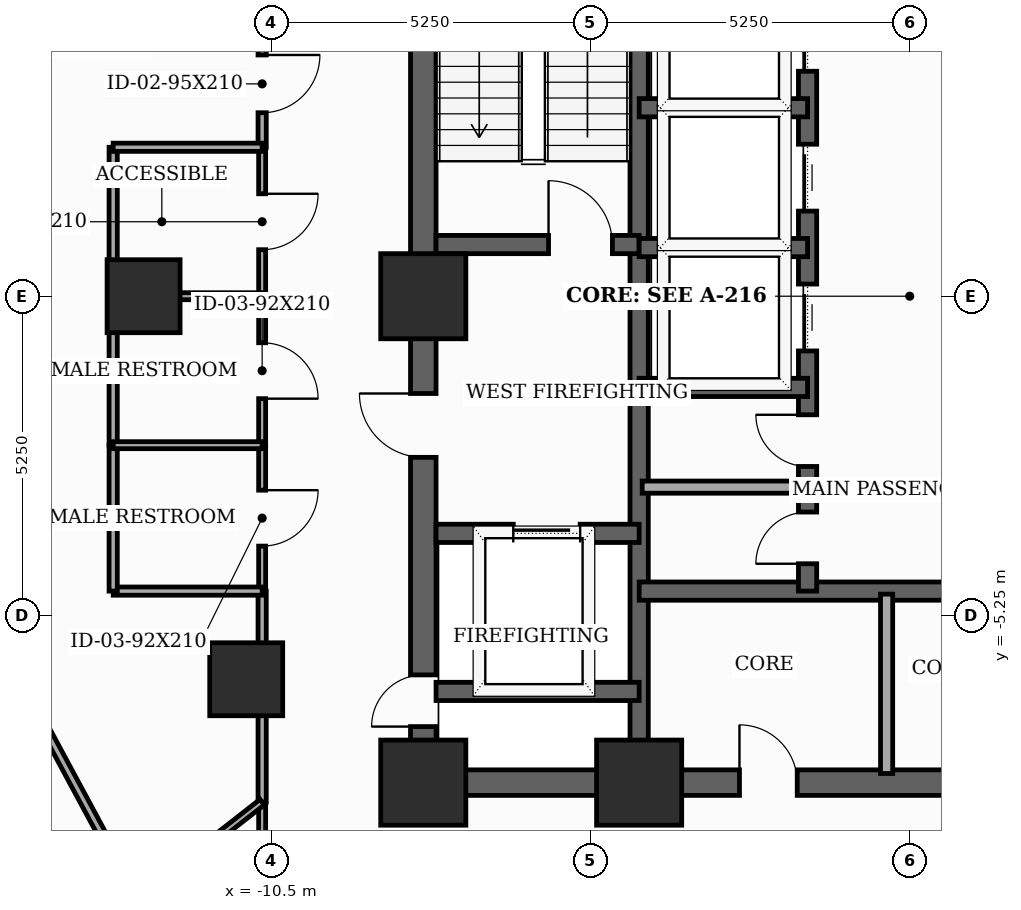
"""IFC4 building model, lengths in metres.
Left out: names, types, materials, properties, quantities, classifications, styles, units other than length and angle.
Written with IfcOpenShell. Run it as: python <this file> out.ifc"""

import sys

from ifc_helpers import new_model, si_unit, direction, frame, frame_2d, origin, origin_2d, place, context, subcontext, project, spatial, rectangle, extrude, element, fill, save


model = new_model("IFC4")
c1 = context("Model", 3, precision=1e-05, world=origin(), true_north=direction((0.0, 1.0)))
c2 = subcontext(c1, "Body", "Model", "MODEL_VIEW")
j1 = project(units=[si_unit("LENGTHUNIT", "METRE"), si_unit("PLANEANGLEUNIT", "RADIAN")], contexts=[c1])
p1 = place(None, origin())
s1 = spatial("IfcSite", under=j1, at=p1, CompositionType="ELEMENT")
p2 = place(p1, origin())
s2 = spatial("IfcBuilding", under=s1, at=p2, CompositionType="ELEMENT")
p3 = place(p2, frame((0.0, 0.0, 101.4)))
s3 = spatial("IfcBuildingStorey", under=s2, at=p3, CompositionType="ELEMENT", Elevation=101.4)
for number, where, z_axis, x_axis in (
    (1, (-8.0, -8.0, 0.0), (0.0, 0.0, 1.0), (1.0, 0.0, 0.0)),
    (2, (-4.45, -8.0, 0.0), (0.0, 0.0, 1.0), (1.0, 0.0, 0.0)),
    (3, (-8.0, 0.0, 0.0), (0.0, 0.0, 1.0), (1.0, 0.0, 0.0)),
):
    element("IfcColumn", number, at=place(p3, frame(where, z_axis=z_axis, x_axis=x_axis)), inside=s3, PredefinedType="COLUMN", context=c2, shape_type="SweptSolid", body=[
        extrude(rectangle(XDim=1.4, YDim=1.4, at=origin_2d()), origin(), (0.0, 0.0, 1.0), 3.7),
    ])
for number, where, z_axis, x_axis in (
    (4, (-12.6, 0.0, 0.0), (0.0, 0.0, 1.0), (1.0, 0.0, 0.0)),
    (5, (-10.912, -6.3, 0.0), (0.0, 0.0, 1.0), (1.0, 0.0, 0.0)),
):
    element("IfcColumn", number, at=place(p3, frame(where, z_axis=z_axis, x_axis=x_axis)), inside=s3, PredefinedType="COLUMN", context=c2, shape_type="SweptSolid", body=[
        extrude(rectangle(XDim=1.2, YDim=1.2, at=origin_2d()), origin(), (0.0, 0.0, 1.0), 3.7),
    ])
p4 = place(p3, frame((-8.0, -8.0, 0.0), z_axis=(0.0, 0.0, 1.0), x_axis=(0.0, 1.0, 0.0)))
e6 = element("IfcWall", 6, at=p4, inside=s3, PredefinedType="SHEAR", context=c2, shape_type="SweptSolid", body=[
    extrude(rectangle(XDim=16.0, YDim=0.42, at=frame_2d((8.0, 0.0))), origin(), (0.0, 0.0, 1.0), 3.5),
])
p5 = place(p4, frame((0.922, 0.0, 0.0)))
e7 = element("IfcOpeningElement", 7, at=p5, cuts=e6, PredefinedType="OPENING", context=c2, shape_type="SweptSolid", body=[
    extrude(rectangle(XDim=0.85, YDim=2.02, at=frame_2d((0.425, 1.01))), frame((0.0, 0.22, 0.0), z_axis=(0.0, -1.0, 0.0), x_axis=(1.0, 0.0, 0.0)), (0.0, 0.0, 1.0), 0.44),
])
p6 = place(p4, frame((5.35, 0.0, 0.0)))
e8 = element("IfcOpeningElement", 8, at=p6, cuts=e6, PredefinedType="OPENING", context=c2, shape_type="SweptSolid", body=[
    extrude(rectangle(XDim=1.05, YDim=2.15, at=frame_2d((0.525, 1.075))), frame((0.0, 0.22, 0.0), z_axis=(0.0, -1.0, 0.0), x_axis=(1.0, 0.0, 0.0)), (0.0, 0.0, 1.0), 0.44),
])
p7 = place(p3, frame((-8.0, -8.0, 0.0), z_axis=(0.0, 0.0, 1.0), x_axis=(1.0, 0.0, 0.0)))
e9 = element("IfcWall", 9, at=p7, inside=s3, PredefinedType="SHEAR", context=c2, shape_type="SweptSolid", body=[
    extrude(rectangle(XDim=16.0, YDim=0.42, at=frame_2d((8.0, 0.0))), origin(), (0.0, 0.0, 1.0), 3.5),
])
p8 = place(p7, frame((5.2, 0.0, 0.0)))
e10 = element("IfcOpeningElement", 10, at=p8, cuts=e9, PredefinedType="OPENING", context=c2, shape_type="SweptSolid", body=[
    extrude(rectangle(XDim=0.95, YDim=2.1, at=frame_2d((0.475, 1.05))), frame((0.0, 0.22, 0.0), z_axis=(0.0, -1.0, 0.0), x_axis=(1.0, 0.0, 0.0)), (0.0, 0.0, 1.0), 0.44),
])
p9 = place(p7, frame((9.8, 0.0, 0.0)))
e11 = element("IfcOpeningElement", 11, at=p9, cuts=e9, PredefinedType="OPENING", context=c2, shape_type="SweptSolid", body=[
    extrude(rectangle(XDim=0.95, YDim=2.1, at=frame_2d((0.475, 1.05))), frame((0.0, 0.22, 0.0), z_axis=(0.0, -1.0, 0.0), x_axis=(1.0, 0.0, 0.0)), (0.0, 0.0, 1.0), 0.44),
])
p10 = place(p3, frame((-4.45, -7.79, 0.0), z_axis=(0.0, 0.0, 1.0), x_axis=(0.0, 1.0, 0.0)))
e12 = element("IfcWall", 12, at=p10, inside=s3, PredefinedType="SHEAR", context=c2, shape_type="SweptSolid", body=[
    extrude(rectangle(XDim=15.58, YDim=0.3, at=frame_2d((7.79, 0.0))), origin(), (0.0, 0.0, 1.0), 3.5),
])
p11 = place(p3, frame((-7.79, 0.85, 0.0), z_axis=(0.0, 0.0, 1.0), x_axis=(1.0, 0.0, 0.0)))
e13 = element("IfcWall", 13, at=p11, inside=s3, PredefinedType="SHEAR", context=c2, shape_type="SweptSolid", body=[
    extrude(rectangle(XDim=3.34, YDim=0.3, at=frame_2d((1.67, 0.0))), origin(), (0.0, 0.0, 1.0), 3.5),
])
p12 = place(p11, frame((1.85, 0.0, 0.0)))
e14 = element("IfcOpeningElement", 14, at=p12, cuts=e13, PredefinedType="OPENING", context=c2, shape_type="SweptSolid", body=[
    extrude(rectangle(XDim=1.05, YDim=2.15, at=frame_2d((0.525, 1.075))), frame((0.0, 0.16, 0.0), z_axis=(0.0, -1.0, 0.0), x_axis=(1.0, 0.0, 0.0)), (0.0, 0.0, 1.0), 0.32),
])
p13 = place(p3, frame((-7.79, -3.9, 0.0), z_axis=(0.0, 0.0, 1.0), x_axis=(1.0, 0.0, 0.0)))
e15 = element("IfcWall", 15, at=p13, inside=s3, PredefinedType="SHEAR", context=c2, shape_type="SweptSolid", body=[
    extrude(rectangle(XDim=3.34, YDim=0.3, at=frame_2d((1.67, 0.0))), origin(), (0.0, 0.0, 1.0), 3.5),
])
p14 = place(p13, frame((1.27, 0.0, 0.0)))
e16 = element("IfcOpeningElement", 16, at=p14, cuts=e15, PredefinedType="OPENING", context=c2, shape_type="SweptSolid", body=[
    extrude(rectangle(XDim=1.1, YDim=2.1, at=frame_2d((0.55, 1.05))), frame((0.0, 0.16, 0.0), z_axis=(0.0, -1.0, 0.0), x_axis=(1.0, 0.0, 0.0)), (0.0, 0.0, 1.0), 0.32),
])
p15 = place(p3, frame((-7.79, -6.5, 0.0), z_axis=(0.0, 0.0, 1.0), x_axis=(1.0, 0.0, 0.0)))
e17 = element("IfcWall", 17, at=p15, inside=s3, PredefinedType="SHEAR", context=c2, shape_type="SweptSolid", body=[
    extrude(rectangle(XDim=3.34, YDim=0.3, at=frame_2d((1.67, 0.0))), origin(), (0.0, 0.0, 1.0), 3.5),
])
p16 = place(p3, frame((-4.45, -4.85, 0.0), z_axis=(0.0, 0.0, 1.0), x_axis=(1.0, 0.0, 0.0)))
e18 = element("IfcWall", 18, at=p16, inside=s3, PredefinedType="SHEAR", context=c2, shape_type="SweptSolid", body=[
    extrude(rectangle(XDim=8.9, YDim=0.3, at=frame_2d((4.45, 0.0))), origin(), (0.0, 0.0, 1.0), 3.5),
])
p17 = place(p3, frame((-1.68, -4.85, 0.0), z_axis=(0.0, 0.0, 1.0), x_axis=(0.0, 1.0, 0.0)))
e19 = element("IfcWall", 19, at=p17, inside=s3, PredefinedType="SHEAR", context=c2, shape_type="SweptSolid", body=[
    extrude(rectangle(XDim=12.64, YDim=0.3, at=frame_2d((6.32, 0.0))), origin(), (0.0, 0.0, 1.0), 3.5),
])
p18 = place(p17, frame((3.95, 0.0, 0.0)))
e20 = element("IfcOpeningElement", 20, at=p18, cuts=e19, PredefinedType="OPENING", context=c2, shape_type="SweptSolid", body=[
    extrude(rectangle(XDim=1.1, YDim=2.1, at=frame_2d((0.55, 1.05))), frame((0.0, 0.16, 0.0), z_axis=(0.0, -1.0, 0.0), x_axis=(1.0, 0.0, 0.0)), (0.0, 0.0, 1.0), 0.32),
])
p19 = place(p17, frame((6.25, 0.0, 0.0)))
e21 = element("IfcOpeningElement", 21, at=p19, cuts=e19, PredefinedType="OPENING", context=c2, shape_type="SweptSolid", body=[
    extrude(rectangle(XDim=1.1, YDim=2.1, at=frame_2d((0.55, 1.05))), frame((0.0, 0.16, 0.0), z_axis=(0.0, -1.0, 0.0), x_axis=(1.0, 0.0, 0.0)), (0.0, 0.0, 1.0), 0.32),
])
p20 = place(p17, frame((8.55, 0.0, 0.0)))
e22 = element("IfcOpeningElement", 22, at=p20, cuts=e19, PredefinedType="OPENING", context=c2, shape_type="SweptSolid", body=[
    extrude(rectangle(XDim=1.1, YDim=2.1, at=frame_2d((0.55, 1.05))), frame((0.0, 0.16, 0.0), z_axis=(0.0, -1.0, 0.0), x_axis=(1.0, 0.0, 0.0)), (0.0, 0.0, 1.0), 0.32),
])
p21 = place(p17, frame((10.85, 0.0, 0.0)))
e23 = element("IfcOpeningElement", 23, at=p21, cuts=e19, PredefinedType="OPENING", context=c2, shape_type="SweptSolid", body=[
    extrude(rectangle(XDim=1.1, YDim=2.1, at=frame_2d((0.55, 1.05))), frame((0.0, 0.16, 0.0), z_axis=(0.0, -1.0, 0.0), x_axis=(1.0, 0.0, 0.0)), (0.0, 0.0, 1.0), 0.32),
])
p22 = place(p17, frame((0.45, 0.0, 0.0)))
e24 = element("IfcOpeningElement", 24, at=p22, cuts=e19, PredefinedType="OPENING", context=c2, shape_type="SweptSolid", body=[
    extrude(rectangle(XDim=0.85, YDim=2.02, at=frame_2d((0.425, 1.01))), frame((0.0, 0.16, 0.0), z_axis=(0.0, -1.0, 0.0), x_axis=(1.0, 0.0, 0.0)), (0.0, 0.0, 1.0), 0.32),
])
p23 = place(p17, frame((2.05, 0.0, 0.0)))
e25 = element("IfcOpeningElement", 25, at=p23, cuts=e19, PredefinedType="OPENING", context=c2, shape_type="SweptSolid", body=[
    extrude(rectangle(XDim=0.85, YDim=2.02, at=frame_2d((0.425, 1.01))), frame((0.0, 0.16, 0.0), z_axis=(0.0, -1.0, 0.0), x_axis=(1.0, 0.0, 0.0)), (0.0, 0.0, 1.0), 0.32),
])
for number, where, z_axis, x_axis in (
    (26, (-4.45, -1.5, 0.0), (0.0, 0.0, 1.0), (1.0, 0.0, 0.0)),
    (27, (-4.45, 0.8, 0.0), (0.0, 0.0, 1.0), (1.0, 0.0, 0.0)),
    (28, (-4.45, 3.1, 0.0), (0.0, 0.0, 1.0), (1.0, 0.0, 0.0)),
):
    element("IfcWall", number, at=place(p3, frame(where, z_axis=z_axis, x_axis=x_axis)), inside=s3, PredefinedType="SHEAR", context=c2, shape_type="SweptSolid", body=[
        extrude(rectangle(XDim=2.77, YDim=0.3, at=frame_2d((1.385, 0.0))), origin(), (0.0, 0.0, 1.0), 3.5),
    ])
p24 = place(p3, frame((-0.38, -7.85, 0.0), z_axis=(0.0, 0.0, 1.0), x_axis=(0.0, 1.0, 0.0)))
e29 = element("IfcWall", 29, at=p24, inside=s3, PredefinedType="SOLIDWALL", context=c2, shape_type="SweptSolid", body=[
    extrude(rectangle(XDim=2.95, YDim=0.2, at=frame_2d((1.475, 0.0))), origin(), (0.0, 0.0, 1.0), 2.885),
])
p25 = place(p3, frame((-4.4, -3.14, 0.0), z_axis=(0.0, 0.0, 1.0), x_axis=(1.0, 0.0, 0.0)))
e30 = element("IfcWall", 30, at=p25, inside=s3, PredefinedType="SOLIDWALL", context=c2, shape_type="SweptSolid", body=[
    extrude(rectangle(XDim=2.68, YDim=0.2, at=frame_2d((1.34, 0.0))), origin(), (0.0, 0.0, 1.0), 3.5),
])
p26 = place(p3, frame((-10.65, -8.321, 0.0), z_axis=(0.0, 0.0, 1.0), x_axis=(0.0, -1.0, 0.0)))
e31 = element("IfcWall", 31, at=p26, inside=s3, PredefinedType="PARTITIONING", context=c2, shape_type="SweptSolid", body=[
    extrude(rectangle(XDim=1.829, YDim=0.115, at=frame_2d((0.915, 0.0))), origin(), (0.0, 0.0, 1.0), 3.5),
])
p27 = place(p3, frame((-10.65, -4.85, 0.0), z_axis=(0.0, 0.0, 1.0), x_axis=(0.0, -1.0, 0.0)))
e32 = element("IfcWall", 32, at=p27, inside=s3, PredefinedType="PARTITIONING", context=c2, shape_type="SweptSolid", body=[
    extrude(rectangle(XDim=3.471, YDim=0.135, at=frame_2d((1.735, 0.0))), origin(), (0.0, 0.0, 1.0), 2.785),
])
p28 = place(p3, frame((-10.65, 5.194, 0.0), z_axis=(0.0, 0.0, 1.0), x_axis=(0.0, -1.0, 0.0)))
e33 = element("IfcWall", 33, at=p28, inside=s3, PredefinedType="PARTITIONING", context=c2, shape_type="SweptSolid", body=[
    extrude(rectangle(XDim=2.744, YDim=0.135, at=frame_2d((1.372, 0.0))), origin(), (0.0, 0.0, 1.0), 3.5),
])
p29 = place(p28, frame((1.226, 0.0, 0.0)))
e34 = element("IfcOpeningElement", 34, at=p29, cuts=e33, PredefinedType="OPENING", context=c2, shape_type="SweptSolid", body=[
    extrude(rectangle(XDim=0.95, YDim=2.1, at=frame_2d((0.475, 1.05))), frame((0.0, 0.077, 0.0), z_axis=(0.0, -1.0, 0.0), x_axis=(1.0, 0.0, 0.0)), (0.0, 0.0, 1.0), 0.155),
])
p30 = place(p3, frame((-10.65, 0.0, 0.0), z_axis=(0.0, 0.0, 1.0), x_axis=(0.0, -1.0, 0.0)))
e35 = element("IfcWall", 35, at=p30, inside=s3, PredefinedType="PARTITIONING", context=c2, shape_type="SweptSolid", body=[
    extrude(rectangle(XDim=2.45, YDim=0.115, at=frame_2d((1.225, 0.0))), origin(), (0.0, 0.0, 1.0), 2.785),
])
p31 = place(p30, frame((0.765, 0.0, 0.0)))
e36 = element("IfcOpeningElement", 36, at=p31, cuts=e35, PredefinedType="OPENING", context=c2, shape_type="SweptSolid", body=[
    extrude(rectangle(XDim=0.92, YDim=2.1, at=frame_2d((0.46, 1.05))), frame((0.0, 0.067, 0.0), z_axis=(0.0, -1.0, 0.0), x_axis=(1.0, 0.0, 0.0)), (0.0, 0.0, 1.0), 0.135),
])
p32 = place(p3, frame((-10.65, -2.45, 0.0), z_axis=(0.0, 0.0, 1.0), x_axis=(0.0, -1.0, 0.0)))
e37 = element("IfcWall", 37, at=p32, inside=s3, PredefinedType="PARTITIONING", context=c2, shape_type="SweptSolid", body=[
    extrude(rectangle(XDim=2.4, YDim=0.115, at=frame_2d((1.2, 0.0))), origin(), (0.0, 0.0, 1.0), 3.5),
])
p33 = place(p32, frame((0.74, 0.0, 0.0)))
e38 = element("IfcOpeningElement", 38, at=p33, cuts=e37, PredefinedType="OPENING", context=c2, shape_type="SweptSolid", body=[
    extrude(rectangle(XDim=0.92, YDim=2.1, at=frame_2d((0.46, 1.05))), frame((0.0, 0.067, 0.0), z_axis=(0.0, -1.0, 0.0), x_axis=(1.0, 0.0, 0.0)), (0.0, 0.0, 1.0), 0.135),
])
p34 = place(p3, frame((-10.65, 2.45, 0.0), z_axis=(0.0, 0.0, 1.0), x_axis=(0.0, -1.0, 0.0)))
e39 = element("IfcWall", 39, at=p34, inside=s3, PredefinedType="PARTITIONING", context=c2, shape_type="SweptSolid", body=[
    extrude(rectangle(XDim=2.45, YDim=0.115, at=frame_2d((1.225, 0.0))), origin(), (0.0, 0.0, 1.0), 2.785),
])
p35 = place(p34, frame((0.765, 0.0, 0.0)))
e40 = element("IfcOpeningElement", 40, at=p35, cuts=e39, PredefinedType="OPENING", context=c2, shape_type="SweptSolid", body=[
    extrude(rectangle(XDim=0.92, YDim=2.1, at=frame_2d((0.46, 1.05))), frame((0.0, 0.067, 0.0), z_axis=(0.0, -1.0, 0.0), x_axis=(1.0, 0.0, 0.0)), (0.0, 0.0, 1.0), 0.135),
])
p36 = place(p3, frame((-10.65, -8.321, 0.0), z_axis=(0.0, 0.0, 1.0), x_axis=(-0.787998815749, -0.615676754782, 0.0)))
e41 = element("IfcWall", 41, at=p36, inside=s3, PredefinedType="PARTITIONING", context=c2, shape_type="SweptSolid", body=[
    extrude(rectangle(XDim=2.607, YDim=0.115, at=frame_2d((1.303, 0.0))), origin(), (0.0, 0.0, 1.0), 3.5),
])
p37 = place(p3, frame((-13.1, -2.45, 0.0), z_axis=(0.0, 0.0, 1.0), x_axis=(0.0, 1.0, 0.0)))
e42 = element("IfcWall", 42, at=p37, inside=s3, PredefinedType="PARTITIONING", context=c2, shape_type="SweptSolid", body=[
    extrude(rectangle(XDim=2.45, YDim=0.135, at=frame_2d((1.225, 0.0))), origin(), (0.0, 0.0, 1.0), 2.785),
])
p38 = place(p3, frame((-10.65, -4.85, 0.0), z_axis=(0.0, 0.0, 1.0), x_axis=(-1.0, 0.0, 0.0)))
e43 = element("IfcWall", 43, at=p38, inside=s3, PredefinedType="PARTITIONING", context=c2, shape_type="SweptSolid", body=[
    extrude(rectangle(XDim=2.45, YDim=0.135, at=frame_2d((1.225, 0.0))), origin(), (0.0, 0.0, 1.0), 2.785),
])
p39 = place(p3, frame((-13.1, -4.85, 0.0), z_axis=(0.0, 0.0, 1.0), x_axis=(0.0, 1.0, 0.0)))
e44 = element("IfcWall", 44, at=p39, inside=s3, PredefinedType="PARTITIONING", context=c2, shape_type="SweptSolid", body=[
    extrude(rectangle(XDim=2.4, YDim=0.135, at=frame_2d((1.2, 0.0))), origin(), (0.0, 0.0, 1.0), 3.5),
])
p40 = place(p3, frame((-15.478, -4.781, 0.0), z_axis=(0.0, 0.0, 1.0), x_axis=(0.47456801742, -0.880218834633, 0.0)))
e45 = element("IfcWall", 45, at=p40, inside=s3, PredefinedType="PARTITIONING", context=c2, shape_type="SweptSolid", body=[
    extrude(rectangle(XDim=5.845, YDim=0.135, at=frame_2d((2.923, 0.0))), origin(), (0.0, 0.0, 1.0), 2.785),
])
p41 = place(p3, frame((-13.1, 0.0, 0.0), z_axis=(0.0, 0.0, 1.0), x_axis=(0.0, 1.0, 0.0)))
e46 = element("IfcWall", 46, at=p41, inside=s3, PredefinedType="PARTITIONING", context=c2, shape_type="SweptSolid", body=[
    extrude(rectangle(XDim=2.45, YDim=0.135, at=frame_2d((1.225, 0.0))), origin(), (0.0, 0.0, 1.0), 2.785),
])
p42 = place(p3, frame((-13.1, 2.45, 0.0), z_axis=(0.0, 0.0, 1.0), x_axis=(1.0, 0.0, 0.0)))
e47 = element("IfcWall", 47, at=p42, inside=s3, PredefinedType="PARTITIONING", context=c2, shape_type="SweptSolid", body=[
    extrude(rectangle(XDim=2.45, YDim=0.135, at=frame_2d((1.225, 0.0))), origin(), (0.0, 0.0, 1.0), 2.785),
])
for number, where, z_axis, x_axis in (
    (48, (-13.1, -2.45, 0.0), (0.0, 0.0, 1.0), (1.0, 0.0, 0.0)),
    (49, (-10.65, 0.0, 0.0), (0.0, 0.0, 1.0), (-1.0, 0.0, 0.0)),
):
    element("IfcWall", number, at=place(p3, frame(where, z_axis=z_axis, x_axis=x_axis)), inside=s3, PredefinedType="PARTITIONING", context=c2, shape_type="SweptSolid", body=[
        extrude(rectangle(XDim=2.45, YDim=0.115, at=frame_2d((1.225, 0.0))), origin(), (0.0, 0.0, 1.0), 2.785),
    ])
p43 = place(p5, origin())
e50 = element("IfcDoor", 50, at=p43, inside=s3, OperationType="SINGLE_SWING_LEFT", PredefinedType="TRAPDOOR", context=c2, shape_type="SweptSolid", body=[
    extrude(rectangle(XDim=0.85, YDim=2.02, at=frame_2d((0.425, 1.01))), frame((0.0, 0.025, 0.0), z_axis=(0.0, -1.0, 0.0), x_axis=(1.0, 0.0, 0.0)), (0.0, 0.0, 1.0), 0.05),
])
fill(e7, e50)
p44 = place(p6, origin())
e51 = element("IfcDoor", 51, at=p44, inside=s3, OperationType="SINGLE_SWING_RIGHT", PredefinedType="DOOR", context=c2, shape_type="SweptSolid", body=[
    extrude(rectangle(XDim=1.05, YDim=2.15, at=frame_2d((0.525, 1.075))), frame((0.0, 0.025, 0.0), z_axis=(0.0, -1.0, 0.0), x_axis=(1.0, 0.0, 0.0)), (0.0, 0.0, 1.0), 0.05),
])
fill(e8, e51)
p45 = place(p8, origin())
e52 = element("IfcDoor", 52, at=p45, inside=s3, OperationType="SINGLE_SWING_LEFT", PredefinedType="DOOR", context=c2, shape_type="SweptSolid", body=[
    extrude(rectangle(XDim=0.95, YDim=2.1, at=frame_2d((0.475, 1.05))), frame((0.0, 0.025, 0.0), z_axis=(0.0, -1.0, 0.0), x_axis=(1.0, 0.0, 0.0)), (0.0, 0.0, 1.0), 0.05),
])
fill(e10, e52)
p46 = place(p12, origin())
e53 = element("IfcDoor", 53, at=p46, inside=s3, OperationType="SINGLE_SWING_LEFT", PredefinedType="DOOR", context=c2, shape_type="SweptSolid", body=[
    extrude(rectangle(XDim=1.05, YDim=2.15, at=frame_2d((0.525, 1.075))), frame((0.0, 0.025, 0.0), z_axis=(0.0, -1.0, 0.0), x_axis=(1.0, 0.0, 0.0)), (0.0, 0.0, 1.0), 0.05),
])
fill(e14, e53)
p47 = place(p14, origin())
e54 = element("IfcDoor", 54, at=p47, inside=s3, OperationType="SLIDING_TO_LEFT", PredefinedType="DOOR", context=c2, shape_type="SweptSolid", body=[
    extrude(rectangle(XDim=1.1, YDim=2.1, at=frame_2d((0.55, 1.05))), frame((0.0, 0.025, 0.0), z_axis=(0.0, -1.0, 0.0), x_axis=(1.0, 0.0, 0.0)), (0.0, 0.0, 1.0), 0.05),
])
fill(e16, e54)
p48 = place(p18, origin())
e55 = element("IfcDoor", 55, at=p48, inside=s3, OperationType="SLIDING_TO_LEFT", PredefinedType="DOOR", context=c2, shape_type="SweptSolid", body=[
    extrude(rectangle(XDim=1.1, YDim=2.1, at=frame_2d((0.55, 1.05))), frame((0.0, 0.025, 0.0), z_axis=(0.0, -1.0, 0.0), x_axis=(1.0, 0.0, 0.0)), (0.0, 0.0, 1.0), 0.05),
])
fill(e20, e55)
p49 = place(p19, origin())
e56 = element("IfcDoor", 56, at=p49, inside=s3, OperationType="SLIDING_TO_LEFT", PredefinedType="DOOR", context=c2, shape_type="SweptSolid", body=[
    extrude(rectangle(XDim=1.1, YDim=2.1, at=frame_2d((0.55, 1.05))), frame((0.0, 0.025, 0.0), z_axis=(0.0, -1.0, 0.0), x_axis=(1.0, 0.0, 0.0)), (0.0, 0.0, 1.0), 0.05),
])
fill(e21, e56)
p50 = place(p20, origin())
e57 = element("IfcDoor", 57, at=p50, inside=s3, OperationType="SLIDING_TO_LEFT", PredefinedType="DOOR", context=c2, shape_type="SweptSolid", body=[
    extrude(rectangle(XDim=1.1, YDim=2.1, at=frame_2d((0.55, 1.05))), frame((0.0, 0.025, 0.0), z_axis=(0.0, -1.0, 0.0), x_axis=(1.0, 0.0, 0.0)), (0.0, 0.0, 1.0), 0.05),
])
fill(e22, e57)
p51 = place(p22, origin())
e58 = element("IfcDoor", 58, at=p51, inside=s3, OperationType="SINGLE_SWING_LEFT", PredefinedType="TRAPDOOR", context=c2, shape_type="SweptSolid", body=[
    extrude(rectangle(XDim=0.85, YDim=2.02, at=frame_2d((0.425, 1.01))), frame((0.0, 0.025, 0.0), z_axis=(0.0, -1.0, 0.0), x_axis=(1.0, 0.0, 0.0)), (0.0, 0.0, 1.0), 0.05),
])
fill(e24, e58)
p52 = place(p23, origin())
e59 = element("IfcDoor", 59, at=p52, inside=s3, OperationType="SINGLE_SWING_RIGHT", PredefinedType="TRAPDOOR", context=c2, shape_type="SweptSolid", body=[
    extrude(rectangle(XDim=0.85, YDim=2.02, at=frame_2d((0.425, 1.01))), frame((0.0, 0.025, 0.0), z_axis=(0.0, -1.0, 0.0), x_axis=(1.0, 0.0, 0.0)), (0.0, 0.0, 1.0), 0.05),
])
fill(e25, e59)
p53 = place(p29, origin())
e60 = element("IfcDoor", 60, at=p53, inside=s3, OperationType="SINGLE_SWING_LEFT", PredefinedType="DOOR", context=c2, shape_type="SweptSolid", body=[
    extrude(rectangle(XDim=0.95, YDim=2.1, at=frame_2d((0.475, 1.05))), frame((0.0, 0.025, 0.0), z_axis=(0.0, -1.0, 0.0), x_axis=(1.0, 0.0, 0.0)), (0.0, 0.0, 1.0), 0.05),
])
fill(e34, e60)
p54 = place(p31, origin())
e61 = element("IfcDoor", 61, at=p54, inside=s3, OperationType="SINGLE_SWING_RIGHT", PredefinedType="DOOR", context=c2, shape_type="SweptSolid", body=[
    extrude(rectangle(XDim=0.92, YDim=2.1, at=frame_2d((0.46, 1.05))), frame((0.0, 0.025, 0.0), z_axis=(0.0, -1.0, 0.0), x_axis=(1.0, 0.0, 0.0)), (0.0, 0.0, 1.0), 0.05),
])
fill(e36, e61)
p55 = place(p33, origin())
e62 = element("IfcDoor", 62, at=p55, inside=s3, OperationType="SINGLE_SWING_LEFT", PredefinedType="DOOR", context=c2, shape_type="SweptSolid", body=[
    extrude(rectangle(XDim=0.92, YDim=2.1, at=frame_2d((0.46, 1.05))), frame((0.0, 0.025, 0.0), z_axis=(0.0, -1.0, 0.0), x_axis=(1.0, 0.0, 0.0)), (0.0, 0.0, 1.0), 0.05),
])
fill(e38, e62)
p56 = place(p35, origin())
e63 = element("IfcDoor", 63, at=p56, inside=s3, OperationType="SINGLE_SWING_LEFT", PredefinedType="DOOR", context=c2, shape_type="SweptSolid", body=[
    extrude(rectangle(XDim=0.92, YDim=2.1, at=frame_2d((0.46, 1.05))), frame((0.0, 0.025, 0.0), z_axis=(0.0, -1.0, 0.0), x_axis=(1.0, 0.0, 0.0)), (0.0, 0.0, 1.0), 0.05),
])
fill(e40, e63)
save(model, sys.argv[1])
